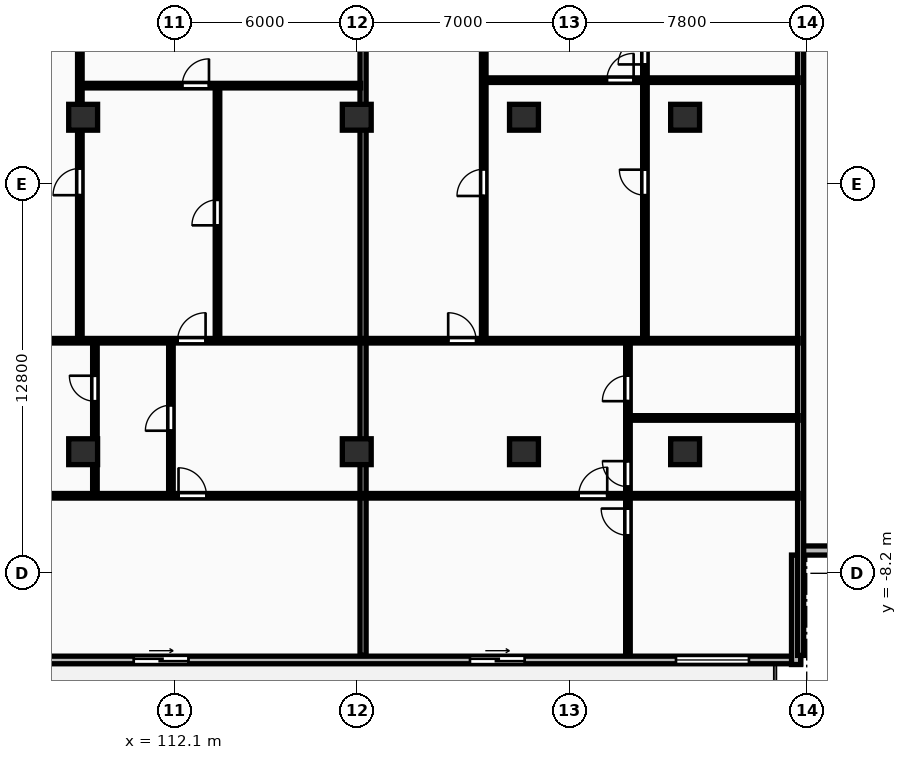
"""IFC4 building model, lengths in metres.
Left out: names, types, materials, properties, quantities, classifications, styles, units other than length and angle.
Written with IfcOpenShell. Run it as: python <this file> out.ifc"""

import sys

from ifc_helpers import new_model, si_unit, direction, frame, frame_2d, origin, origin_2d, place, context, subcontext, project, spatial, rectangle, extrude, element, fill, save


model = new_model("IFC4")
c1 = context("Model", 3, precision=1e-05, world=origin(), true_north=direction((0.0, 1.0)))
c2 = subcontext(c1, "Body", "Model", "MODEL_VIEW")
j1 = project(units=[si_unit("LENGTHUNIT", "METRE"), si_unit("PLANEANGLEUNIT", "RADIAN")], contexts=[c1])
p1 = place(None, origin())
s1 = spatial("IfcSite", under=j1, at=p1, CompositionType="ELEMENT")
p2 = place(p1, origin())
s2 = spatial("IfcBuilding", under=s1, at=p2, CompositionType="ELEMENT")
p3 = place(p2, frame((0.0, 0.0, 24.0)))
s3 = spatial("IfcBuildingStorey", under=s2, at=p3, CompositionType="ELEMENT", Elevation=24.0)
for number, where, z_axis, x_axis in (
    (1, (109.1, -4.2, 0.0), (0.0, 0.0, 1.0), (1.0, 0.0, 0.0)),
    (2, (109.1, 6.8, 0.0), (0.0, 0.0, 1.0), (1.0, 0.0, 0.0)),
    (3, (118.1, -4.2, 0.0), (0.0, 0.0, 1.0), (1.0, 0.0, 0.0)),
    (4, (118.1, 6.8, 0.0), (0.0, 0.0, 1.0), (1.0, 0.0, 0.0)),
    (5, (123.6, -4.2, 0.0), (0.0, 0.0, 1.0), (1.0, 0.0, 0.0)),
    (6, (123.6, 6.8, 0.0), (0.0, 0.0, 1.0), (1.0, 0.0, 0.0)),
    (7, (128.9, -4.2, 0.0), (0.0, 0.0, 1.0), (1.0, 0.0, 0.0)),
    (8, (128.9, 6.8, 0.0), (0.0, 0.0, 1.0), (1.0, 0.0, 0.0)),
):
    element("IfcColumn", number, at=place(p3, frame(where, z_axis=z_axis, x_axis=x_axis)), inside=s3, PredefinedType="COLUMN", context=c2, shape_type="SweptSolid", body=[
        extrude(rectangle(XDim=0.95, YDim=0.85, at=origin_2d()), origin(), (0.0, 0.0, 1.0), 3.25),
    ])
p4 = place(p3, frame((70.7, -11.05, 0.0), z_axis=(0.0, 0.0, 1.0), x_axis=(1.0, 0.0, 0.0)))
e9 = element("IfcWall", 9, at=p4, inside=s3, PredefinedType="STANDARD", context=c2, shape_type="SweptSolid", body=[
    extrude(rectangle(XDim=62.0, YDim=0.25, at=frame_2d((31.0, 0.0))), origin(), (0.0, 0.0, 1.0), 2.97),
])
p5 = place(p4, frame((4.636, 0.0, 0.0)))
e10 = element("IfcOpeningElement", 10, at=p5, cuts=e9, PredefinedType="OPENING", context=c2, shape_type="SweptSolid", body=[
    extrude(rectangle(XDim=1.8, YDim=2.2, at=frame_2d((0.9, 1.1))), frame((0.0, 0.135, 0.0), z_axis=(0.0, -1.0, 0.0), x_axis=(1.0, 0.0, 0.0)), (0.0, 0.0, 1.0), 0.27),
])
p6 = place(p4, frame((16.261, 0.0, 0.0)))
e11 = element("IfcOpeningElement", 11, at=p6, cuts=e9, PredefinedType="OPENING", context=c2, shape_type="SweptSolid", body=[
    extrude(rectangle(XDim=1.8, YDim=2.2, at=frame_2d((0.9, 1.1))), frame((0.0, 0.135, 0.0), z_axis=(0.0, -1.0, 0.0), x_axis=(1.0, 0.0, 0.0)), (0.0, 0.0, 1.0), 0.27),
])
p7 = place(p4, frame((27.886, 0.0, 0.0)))
e12 = element("IfcOpeningElement", 12, at=p7, cuts=e9, PredefinedType="OPENING", context=c2, shape_type="SweptSolid", body=[
    extrude(rectangle(XDim=1.8, YDim=2.2, at=frame_2d((0.9, 1.1))), frame((0.0, 0.135, 0.0), z_axis=(0.0, -1.0, 0.0), x_axis=(1.0, 0.0, 0.0)), (0.0, 0.0, 1.0), 0.27),
])
p8 = place(p4, frame((40.064, 0.0, 0.0)))
e13 = element("IfcOpeningElement", 13, at=p8, cuts=e9, PredefinedType="OPENING", context=c2, shape_type="SweptSolid", body=[
    extrude(rectangle(XDim=1.8, YDim=2.2, at=frame_2d((0.9, 1.1))), frame((0.0, 0.135, 0.0), z_axis=(0.0, -1.0, 0.0), x_axis=(1.0, 0.0, 0.0)), (0.0, 0.0, 1.0), 0.27),
])
p9 = place(p4, frame((51.124, 0.0, 0.0)))
e14 = element("IfcOpeningElement", 14, at=p9, cuts=e9, PredefinedType="OPENING", context=c2, shape_type="SweptSolid", body=[
    extrude(rectangle(XDim=1.8, YDim=2.2, at=frame_2d((0.9, 1.1))), frame((0.0, 0.135, 0.0), z_axis=(0.0, -1.0, 0.0), x_axis=(1.0, 0.0, 0.0)), (0.0, 0.0, 1.0), 0.27),
])
p10 = place(p4, frame((57.9, 0.0, 0.85)))
e15 = element("IfcOpeningElement", 15, at=p10, cuts=e9, PredefinedType="OPENING", context=c2, shape_type="SweptSolid", body=[
    extrude(rectangle(XDim=2.4, YDim=1.9, at=frame_2d((1.2, 0.95))), frame((0.0, 0.135, 0.0), z_axis=(0.0, -1.0, 0.0), x_axis=(1.0, 0.0, 0.0)), (0.0, 0.0, 1.0), 0.27),
])
p11 = place(p3, frame((132.55, -11.2, 0.0), z_axis=(0.0, 0.0, 1.0), x_axis=(0.0, 1.0, 0.0)))
e16 = element("IfcWall", 16, at=p11, inside=s3, PredefinedType="STANDARD", context=c2, shape_type="SweptSolid", body=[
    extrude(rectangle(XDim=3.6, YDim=0.3, at=frame_2d((1.8, 0.0))), origin(), (0.0, 0.0, 1.0), 2.97),
])
p12 = place(p3, frame((132.7, -7.45, 0.0), z_axis=(0.0, 0.0, 1.0), x_axis=(1.0, 0.0, 0.0)))
e17 = element("IfcWall", 17, at=p12, inside=s3, PredefinedType="STANDARD", context=c2, shape_type="SweptSolid", body=[
    extrude(rectangle(XDim=3.6, YDim=0.3, at=frame_2d((1.8, 0.0))), origin(), (0.0, 0.0, 1.0), 2.97),
])
p13 = place(p3, frame((132.7, -10.9, 0.0), z_axis=(0.0, 0.0, 1.0), x_axis=(0.0, 1.0, 0.0)))
e18 = element("IfcWall", 18, at=p13, inside=s3, PredefinedType="PARTITIONING", context=c2, shape_type="SweptSolid", body=[
    extrude(rectangle(XDim=27.07, YDim=0.2, at=frame_2d((13.535, 0.0))), origin(), (0.0, 0.0, 1.0), 2.97),
])
p14 = place(p3, frame((118.307, -10.9, 0.0), z_axis=(0.0, 0.0, 1.0), x_axis=(0.0, 1.0, 0.0)))
e19 = element("IfcWall", 19, at=p14, inside=s3, PredefinedType="PARTITIONING", context=c2, shape_type="SweptSolid", body=[
    extrude(rectangle(XDim=27.07, YDim=0.2, at=frame_2d((13.535, 0.0))), origin(), (0.0, 0.0, 1.0), 2.22),
])
p15 = place(p3, frame((113.519, -0.51, 0.0), z_axis=(0.0, 0.0, 1.0), x_axis=(0.0, 1.0, 0.0)))
e20 = element("IfcWall", 20, at=p15, inside=s3, PredefinedType="PARTITIONING", context=c2, shape_type="SweptSolid", body=[
    extrude(rectangle(XDim=8.35, YDim=0.15, at=frame_2d((4.175, 0.0))), origin(), (0.0, 0.0, 1.0), 2.97),
])
p16 = place(p15, frame((3.755, 0.0, 0.0)))
e21 = element("IfcOpeningElement", 21, at=p16, cuts=e20, PredefinedType="OPENING", context=c2, shape_type="SweptSolid", body=[
    extrude(rectangle(XDim=0.84, YDim=2.04, at=frame_2d((0.42, 1.02))), frame((0.0, 0.085, 0.0), z_axis=(0.0, -1.0, 0.0), x_axis=(1.0, 0.0, 0.0)), (0.0, 0.0, 1.0), 0.17),
])
p17 = place(p3, frame((109.052, 7.84, 0.0), z_axis=(0.0, 0.0, 1.0), x_axis=(1.0, 0.0, 0.0)))
e22 = element("IfcWall", 22, at=p17, inside=s3, PredefinedType="PARTITIONING", context=c2, shape_type="SweptSolid", body=[
    extrude(rectangle(XDim=9.176, YDim=0.15, at=frame_2d((4.588, 0.0))), origin(), (0.0, 0.0, 1.0), 2.97),
])
p18 = place(p17, frame((3.307, 0.0, 0.0)))
e23 = element("IfcOpeningElement", 23, at=p18, cuts=e22, PredefinedType="OPENING", context=c2, shape_type="SweptSolid", body=[
    extrude(rectangle(XDim=0.88, YDim=2.06, at=frame_2d((0.44, 1.03))), frame((0.0, 0.085, 0.0), z_axis=(0.0, -1.0, 0.0), x_axis=(1.0, 0.0, 0.0)), (0.0, 0.0, 1.0), 0.17),
])
p19 = place(p3, frame((108.991, -0.51, 0.0), z_axis=(0.0, 0.0, 1.0), x_axis=(0.0, 1.0, 0.0)))
e24 = element("IfcWall", 24, at=p19, inside=s3, PredefinedType="PARTITIONING", context=c2, shape_type="SweptSolid", body=[
    extrude(rectangle(XDim=16.7, YDim=0.15, at=frame_2d((8.35, 0.0))), origin(), (0.0, 0.0, 1.0), 2.22),
])
p20 = place(p19, frame((4.747, 0.0, 0.0)))
e25 = element("IfcOpeningElement", 25, at=p20, cuts=e24, PredefinedType="OPENING", context=c2, shape_type="SweptSolid", body=[
    extrude(rectangle(XDim=0.88, YDim=2.06, at=frame_2d((0.44, 1.03))), frame((0.0, 0.085, 0.0), z_axis=(0.0, -1.0, 0.0), x_axis=(1.0, 0.0, 0.0)), (0.0, 0.0, 1.0), 0.17),
])
p21 = place(p3, frame((109.487, -5.59, 0.0), z_axis=(0.0, 0.0, 1.0), x_axis=(0.0, 1.0, 0.0)))
e26 = element("IfcWall", 26, at=p21, inside=s3, PredefinedType="PARTITIONING", context=c2, shape_type="SweptSolid", body=[
    extrude(rectangle(XDim=5.0, YDim=0.15, at=frame_2d((2.5, 0.0))), origin(), (0.0, 0.0, 1.0), 2.22),
])
p22 = place(p21, frame((3.049, 0.0, 0.0)))
e27 = element("IfcOpeningElement", 27, at=p22, cuts=e26, PredefinedType="OPENING", context=c2, shape_type="SweptSolid", body=[
    extrude(rectangle(XDim=0.84, YDim=2.04, at=frame_2d((0.42, 1.02))), frame((0.0, 0.085, 0.0), z_axis=(0.0, -1.0, 0.0), x_axis=(1.0, 0.0, 0.0)), (0.0, 0.0, 1.0), 0.17),
])
p23 = place(p3, frame((111.987, -5.59, 0.0), z_axis=(0.0, 0.0, 1.0), x_axis=(0.0, 1.0, 0.0)))
e28 = element("IfcWall", 28, at=p23, inside=s3, PredefinedType="PARTITIONING", context=c2, shape_type="SweptSolid", body=[
    extrude(rectangle(XDim=5.0, YDim=0.15, at=frame_2d((2.5, 0.0))), origin(), (0.0, 0.0, 1.0), 2.97),
])
p24 = place(p23, frame((2.08, 0.0, 0.0)))
e29 = element("IfcOpeningElement", 29, at=p24, cuts=e28, PredefinedType="OPENING", context=c2, shape_type="SweptSolid", body=[
    extrude(rectangle(XDim=0.84, YDim=2.04, at=frame_2d((0.42, 1.02))), frame((0.0, 0.085, 0.0), z_axis=(0.0, -1.0, 0.0), x_axis=(1.0, 0.0, 0.0)), (0.0, 0.0, 1.0), 0.17),
])
p25 = place(p3, frame((105.101, -0.55, 0.0), z_axis=(0.0, 0.0, 1.0), x_axis=(1.0, 0.0, 0.0)))
e30 = element("IfcWall", 30, at=p25, inside=s3, PredefinedType="PARTITIONING", context=c2, shape_type="SweptSolid", body=[
    extrude(rectangle(XDim=13.126, YDim=0.15, at=frame_2d((6.563, 0.0))), origin(), (0.0, 0.0, 1.0), 2.97),
])
p26 = place(p25, frame((7.106, 0.0, 0.0)))
e31 = element("IfcOpeningElement", 31, at=p26, cuts=e30, PredefinedType="OPENING", context=c2, shape_type="SweptSolid", body=[
    extrude(rectangle(XDim=0.92, YDim=2.08, at=frame_2d((0.46, 1.04))), frame((0.0, 0.085, 0.0), z_axis=(0.0, -1.0, 0.0), x_axis=(1.0, 0.0, 0.0)), (0.0, 0.0, 1.0), 0.17),
])
p27 = place(p3, frame((105.101, -5.65, 0.0), z_axis=(0.0, 0.0, 1.0), x_axis=(1.0, 0.0, 0.0)))
e32 = element("IfcWall", 32, at=p27, inside=s3, PredefinedType="PARTITIONING", context=c2, shape_type="SweptSolid", body=[
    extrude(rectangle(XDim=13.126, YDim=0.15, at=frame_2d((6.563, 0.0))), origin(), (0.0, 0.0, 1.0), 2.97),
])
p28 = place(p27, frame((7.136, 0.0, 0.0)))
e33 = element("IfcOpeningElement", 33, at=p28, cuts=e32, PredefinedType="OPENING", context=c2, shape_type="SweptSolid", body=[
    extrude(rectangle(XDim=0.92, YDim=2.08, at=frame_2d((0.46, 1.04))), frame((0.0, 0.085, 0.0), z_axis=(0.0, -1.0, 0.0), x_axis=(1.0, 0.0, 0.0)), (0.0, 0.0, 1.0), 0.17),
])
p29 = place(p3, frame((127.579, -0.51, 0.0), z_axis=(0.0, 0.0, 1.0), x_axis=(0.0, 1.0, 0.0)))
e34 = element("IfcWall", 34, at=p29, inside=s3, PredefinedType="PARTITIONING", context=c2, shape_type="SweptSolid", body=[
    extrude(rectangle(XDim=16.7, YDim=0.15, at=frame_2d((8.35, 0.0))), origin(), (0.0, 0.0, 1.0), 2.97),
])
p30 = place(p29, frame((4.746, 0.0, 0.0)))
e35 = element("IfcOpeningElement", 35, at=p30, cuts=e34, PredefinedType="OPENING", context=c2, shape_type="SweptSolid", body=[
    extrude(rectangle(XDim=0.84, YDim=2.04, at=frame_2d((0.42, 1.02))), frame((0.0, 0.085, 0.0), z_axis=(0.0, -1.0, 0.0), x_axis=(1.0, 0.0, 0.0)), (0.0, 0.0, 1.0), 0.17),
])
p31 = place(p29, frame((9.048, 0.0, 0.0)))
e36 = element("IfcOpeningElement", 36, at=p31, cuts=e34, PredefinedType="OPENING", context=c2, shape_type="SweptSolid", body=[
    extrude(rectangle(XDim=0.88, YDim=2.06, at=frame_2d((0.44, 1.03))), frame((0.0, 0.085, 0.0), z_axis=(0.0, -1.0, 0.0), x_axis=(1.0, 0.0, 0.0)), (0.0, 0.0, 1.0), 0.17),
])
p32 = place(p3, frame((122.337, 8.02, 0.0), z_axis=(0.0, 0.0, 1.0), x_axis=(1.0, 0.0, 0.0)))
e37 = element("IfcWall", 37, at=p32, inside=s3, PredefinedType="PARTITIONING", context=c2, shape_type="SweptSolid", body=[
    extrude(rectangle(XDim=10.283, YDim=0.15, at=frame_2d((5.142, 0.0))), origin(), (0.0, 0.0, 1.0), 2.97),
])
p33 = place(p32, frame((3.99, 0.0, 0.0)))
e38 = element("IfcOpeningElement", 38, at=p33, cuts=e37, PredefinedType="OPENING", context=c2, shape_type="SweptSolid", body=[
    extrude(rectangle(XDim=0.88, YDim=2.06, at=frame_2d((0.44, 1.03))), frame((0.0, 0.085, 0.0), z_axis=(0.0, -1.0, 0.0), x_axis=(1.0, 0.0, 0.0)), (0.0, 0.0, 1.0), 0.17),
])
p34 = place(p3, frame((122.277, -0.51, 0.0), z_axis=(0.0, 0.0, 1.0), x_axis=(0.0, 1.0, 0.0)))
e39 = element("IfcWall", 39, at=p34, inside=s3, PredefinedType="PARTITIONING", context=c2, shape_type="SweptSolid", body=[
    extrude(rectangle(XDim=16.7, YDim=0.15, at=frame_2d((8.35, 0.0))), origin(), (0.0, 0.0, 1.0), 2.97),
])
p35 = place(p34, frame((4.721, 0.0, 0.0)))
e40 = element("IfcOpeningElement", 40, at=p35, cuts=e39, PredefinedType="OPENING", context=c2, shape_type="SweptSolid", body=[
    extrude(rectangle(XDim=0.88, YDim=2.06, at=frame_2d((0.44, 1.03))), frame((0.0, 0.085, 0.0), z_axis=(0.0, -1.0, 0.0), x_axis=(1.0, 0.0, 0.0)), (0.0, 0.0, 1.0), 0.17),
])
p36 = place(p3, frame((127.08, -3.09, 0.0), z_axis=(0.0, 0.0, 1.0), x_axis=(1.0, 0.0, 0.0)))
e41 = element("IfcWall", 41, at=p36, inside=s3, PredefinedType="PARTITIONING", context=c2, shape_type="SweptSolid", body=[
    extrude(rectangle(XDim=5.54, YDim=0.15, at=frame_2d((2.77, 0.0))), origin(), (0.0, 0.0, 1.0), 2.97),
])
p37 = place(p3, frame((127.02, -10.9, 0.0), z_axis=(0.0, 0.0, 1.0), x_axis=(0.0, 1.0, 0.0)))
e42 = element("IfcWall", 42, at=p37, inside=s3, PredefinedType="PARTITIONING", context=c2, shape_type="SweptSolid", body=[
    extrude(rectangle(XDim=10.31, YDim=0.15, at=frame_2d((5.155, 0.0))), origin(), (0.0, 0.0, 1.0), 2.97),
])
p38 = place(p37, frame((5.55, 0.0, 0.0)))
e43 = element("IfcOpeningElement", 43, at=p38, cuts=e42, PredefinedType="OPENING", context=c2, shape_type="SweptSolid", body=[
    extrude(rectangle(XDim=0.84, YDim=2.04, at=frame_2d((0.42, 1.02))), frame((0.0, 0.085, 0.0), z_axis=(0.0, -1.0, 0.0), x_axis=(1.0, 0.0, 0.0)), (0.0, 0.0, 1.0), 0.17),
])
p39 = place(p37, frame((8.362, 0.0, 0.0)))
e44 = element("IfcOpeningElement", 44, at=p39, cuts=e42, PredefinedType="OPENING", context=c2, shape_type="SweptSolid", body=[
    extrude(rectangle(XDim=0.84, YDim=2.04, at=frame_2d((0.42, 1.02))), frame((0.0, 0.085, 0.0), z_axis=(0.0, -1.0, 0.0), x_axis=(1.0, 0.0, 0.0)), (0.0, 0.0, 1.0), 0.17),
])
p40 = place(p37, frame((3.95, 0.0, 0.0)))
e45 = element("IfcOpeningElement", 45, at=p40, cuts=e42, PredefinedType="OPENING", context=c2, shape_type="SweptSolid", body=[
    extrude(rectangle(XDim=0.88, YDim=2.06, at=frame_2d((0.44, 1.03))), frame((0.0, 0.085, 0.0), z_axis=(0.0, -1.0, 0.0), x_axis=(1.0, 0.0, 0.0)), (0.0, 0.0, 1.0), 0.17),
])
p41 = place(p3, frame((118.387, -0.55, 0.0), z_axis=(0.0, 0.0, 1.0), x_axis=(1.0, 0.0, 0.0)))
e46 = element("IfcWall", 46, at=p41, inside=s3, PredefinedType="PARTITIONING", context=c2, shape_type="SweptSolid", body=[
    extrude(rectangle(XDim=14.233, YDim=0.15, at=frame_2d((7.116, 0.0))), origin(), (0.0, 0.0, 1.0), 2.97),
])
p42 = place(p41, frame((2.72, 0.0, 0.0)))
e47 = element("IfcOpeningElement", 47, at=p42, cuts=e46, PredefinedType="OPENING", context=c2, shape_type="SweptSolid", body=[
    extrude(rectangle(XDim=0.92, YDim=2.08, at=frame_2d((0.46, 1.04))), frame((0.0, 0.085, 0.0), z_axis=(0.0, -1.0, 0.0), x_axis=(1.0, 0.0, 0.0)), (0.0, 0.0, 1.0), 0.17),
])
p43 = place(p3, frame((118.387, -5.65, 0.0), z_axis=(0.0, 0.0, 1.0), x_axis=(1.0, 0.0, 0.0)))
e48 = element("IfcWall", 48, at=p43, inside=s3, PredefinedType="PARTITIONING", context=c2, shape_type="SweptSolid", body=[
    extrude(rectangle(XDim=14.233, YDim=0.15, at=frame_2d((7.116, 0.0))), origin(), (0.0, 0.0, 1.0), 2.97),
])
p44 = place(p43, frame((7.011, 0.0, 0.0)))
e49 = element("IfcOpeningElement", 49, at=p44, cuts=e48, PredefinedType="OPENING", context=c2, shape_type="SweptSolid", body=[
    extrude(rectangle(XDim=0.94, YDim=2.1, at=frame_2d((0.47, 1.05))), frame((0.0, 0.085, 0.0), z_axis=(0.0, -1.0, 0.0), x_axis=(1.0, 0.0, 0.0)), (0.0, 0.0, 1.0), 0.17),
])
p45 = place(p8, origin())
e50 = element("IfcDoor", 50, at=p45, inside=s3, OperationType="SLIDING_TO_RIGHT", PredefinedType="DOOR", context=c2, shape_type="SweptSolid", body=[
    extrude(rectangle(XDim=1.8, YDim=2.2, at=frame_2d((0.9, 1.1))), frame((0.0, 0.025, 0.0), z_axis=(0.0, -1.0, 0.0), x_axis=(1.0, 0.0, 0.0)), (0.0, 0.0, 1.0), 0.05),
])
fill(e13, e50)
p46 = place(p9, origin())
e51 = element("IfcDoor", 51, at=p46, inside=s3, OperationType="SLIDING_TO_RIGHT", PredefinedType="DOOR", context=c2, shape_type="SweptSolid", body=[
    extrude(rectangle(XDim=1.8, YDim=2.2, at=frame_2d((0.9, 1.1))), frame((0.0, 0.025, 0.0), z_axis=(0.0, -1.0, 0.0), x_axis=(1.0, 0.0, 0.0)), (0.0, 0.0, 1.0), 0.05),
])
fill(e14, e51)
p47 = place(p10, origin())
e52 = element("IfcWindow", 52, at=p47, inside=s3, PartitioningType="DOUBLE_PANEL_VERTICAL", PredefinedType="WINDOW", context=c2, shape_type="SweptSolid", body=[
    extrude(rectangle(XDim=2.4, YDim=1.9, at=frame_2d((1.2, 0.95))), frame((0.0, 0.03, 0.0), z_axis=(0.0, -1.0, 0.0), x_axis=(1.0, 0.0, 0.0)), (0.0, 0.0, 1.0), 0.06),
])
fill(e15, e52)
p48 = place(p16, origin())
e53 = element("IfcDoor", 53, at=p48, inside=s3, OperationType="SINGLE_SWING_LEFT", PredefinedType="DOOR", context=c2, shape_type="SweptSolid", body=[
    extrude(rectangle(XDim=0.84, YDim=2.04, at=frame_2d((0.42, 1.02))), frame((0.0, 0.025, 0.0), z_axis=(0.0, -1.0, 0.0), x_axis=(1.0, 0.0, 0.0)), (0.0, 0.0, 1.0), 0.05),
])
fill(e21, e53)
p49 = place(p18, origin())
e54 = element("IfcDoor", 54, at=p49, inside=s3, OperationType="SINGLE_SWING_RIGHT", PredefinedType="DOOR", context=c2, shape_type="SweptSolid", body=[
    extrude(rectangle(XDim=0.88, YDim=2.06, at=frame_2d((0.44, 1.03))), frame((0.0, 0.025, 0.0), z_axis=(0.0, -1.0, 0.0), x_axis=(1.0, 0.0, 0.0)), (0.0, 0.0, 1.0), 0.05),
])
fill(e23, e54)
p50 = place(p20, origin())
e55 = element("IfcDoor", 55, at=p50, inside=s3, OperationType="SINGLE_SWING_LEFT", PredefinedType="DOOR", context=c2, shape_type="SweptSolid", body=[
    extrude(rectangle(XDim=0.88, YDim=2.06, at=frame_2d((0.44, 1.03))), frame((0.0, 0.025, 0.0), z_axis=(0.0, -1.0, 0.0), x_axis=(1.0, 0.0, 0.0)), (0.0, 0.0, 1.0), 0.05),
])
fill(e25, e55)
p51 = place(p22, origin())
e56 = element("IfcDoor", 56, at=p51, inside=s3, OperationType="SINGLE_SWING_RIGHT", PredefinedType="DOOR", context=c2, shape_type="SweptSolid", body=[
    extrude(rectangle(XDim=0.84, YDim=2.04, at=frame_2d((0.42, 1.02))), frame((0.0, 0.025, 0.0), z_axis=(0.0, -1.0, 0.0), x_axis=(1.0, 0.0, 0.0)), (0.0, 0.0, 1.0), 0.05),
])
fill(e27, e56)
p52 = place(p24, origin())
e57 = element("IfcDoor", 57, at=p52, inside=s3, OperationType="SINGLE_SWING_LEFT", PredefinedType="DOOR", context=c2, shape_type="SweptSolid", body=[
    extrude(rectangle(XDim=0.84, YDim=2.04, at=frame_2d((0.42, 1.02))), frame((0.0, 0.025, 0.0), z_axis=(0.0, -1.0, 0.0), x_axis=(1.0, 0.0, 0.0)), (0.0, 0.0, 1.0), 0.05),
])
fill(e29, e57)
p53 = place(p26, origin())
e58 = element("IfcDoor", 58, at=p53, inside=s3, OperationType="SINGLE_SWING_RIGHT", PredefinedType="DOOR", context=c2, shape_type="SweptSolid", body=[
    extrude(rectangle(XDim=0.92, YDim=2.08, at=frame_2d((0.46, 1.04))), frame((0.0, 0.025, 0.0), z_axis=(0.0, -1.0, 0.0), x_axis=(1.0, 0.0, 0.0)), (0.0, 0.0, 1.0), 0.05),
])
fill(e31, e58)
p54 = place(p28, origin())
e59 = element("IfcDoor", 59, at=p54, inside=s3, OperationType="SINGLE_SWING_LEFT", PredefinedType="DOOR", context=c2, shape_type="SweptSolid", body=[
    extrude(rectangle(XDim=0.92, YDim=2.08, at=frame_2d((0.46, 1.04))), frame((0.0, 0.025, 0.0), z_axis=(0.0, -1.0, 0.0), x_axis=(1.0, 0.0, 0.0)), (0.0, 0.0, 1.0), 0.05),
])
fill(e33, e59)
p55 = place(p30, origin())
e60 = element("IfcDoor", 60, at=p55, inside=s3, OperationType="SINGLE_SWING_RIGHT", PredefinedType="DOOR", context=c2, shape_type="SweptSolid", body=[
    extrude(rectangle(XDim=0.84, YDim=2.04, at=frame_2d((0.42, 1.02))), frame((0.0, 0.025, 0.0), z_axis=(0.0, -1.0, 0.0), x_axis=(1.0, 0.0, 0.0)), (0.0, 0.0, 1.0), 0.05),
])
fill(e35, e60)
p56 = place(p31, origin())
e61 = element("IfcDoor", 61, at=p56, inside=s3, OperationType="SINGLE_SWING_LEFT", PredefinedType="DOOR", context=c2, shape_type="SweptSolid", body=[
    extrude(rectangle(XDim=0.88, YDim=2.06, at=frame_2d((0.44, 1.03))), frame((0.0, 0.025, 0.0), z_axis=(0.0, -1.0, 0.0), x_axis=(1.0, 0.0, 0.0)), (0.0, 0.0, 1.0), 0.05),
])
fill(e36, e61)
p57 = place(p33, origin())
e62 = element("IfcDoor", 62, at=p57, inside=s3, OperationType="SINGLE_SWING_RIGHT", PredefinedType="DOOR", context=c2, shape_type="SweptSolid", body=[
    extrude(rectangle(XDim=0.88, YDim=2.06, at=frame_2d((0.44, 1.03))), frame((0.0, 0.025, 0.0), z_axis=(0.0, -1.0, 0.0), x_axis=(1.0, 0.0, 0.0)), (0.0, 0.0, 1.0), 0.05),
])
fill(e38, e62)
p58 = place(p35, origin())
e63 = element("IfcDoor", 63, at=p58, inside=s3, OperationType="SINGLE_SWING_LEFT", PredefinedType="DOOR", context=c2, shape_type="SweptSolid", body=[
    extrude(rectangle(XDim=0.88, YDim=2.06, at=frame_2d((0.44, 1.03))), frame((0.0, 0.025, 0.0), z_axis=(0.0, -1.0, 0.0), x_axis=(1.0, 0.0, 0.0)), (0.0, 0.0, 1.0), 0.05),
])
fill(e40, e63)
p59 = place(p38, origin())
e64 = element("IfcDoor", 64, at=p59, inside=s3, OperationType="SINGLE_SWING_RIGHT", PredefinedType="DOOR", context=c2, shape_type="SweptSolid", body=[
    extrude(rectangle(XDim=0.84, YDim=2.04, at=frame_2d((0.42, 1.02))), frame((0.0, 0.025, 0.0), z_axis=(0.0, -1.0, 0.0), x_axis=(1.0, 0.0, 0.0)), (0.0, 0.0, 1.0), 0.05),
])
fill(e43, e64)
p60 = place(p39, origin())
e65 = element("IfcDoor", 65, at=p60, inside=s3, OperationType="SINGLE_SWING_LEFT", PredefinedType="DOOR", context=c2, shape_type="SweptSolid", body=[
    extrude(rectangle(XDim=0.84, YDim=2.04, at=frame_2d((0.42, 1.02))), frame((0.0, 0.025, 0.0), z_axis=(0.0, -1.0, 0.0), x_axis=(1.0, 0.0, 0.0)), (0.0, 0.0, 1.0), 0.05),
])
fill(e44, e65)
p61 = place(p40, origin())
e66 = element("IfcDoor", 66, at=p61, inside=s3, OperationType="SINGLE_SWING_RIGHT", PredefinedType="DOOR", context=c2, shape_type="SweptSolid", body=[
    extrude(rectangle(XDim=0.88, YDim=2.06, at=frame_2d((0.44, 1.03))), frame((0.0, 0.025, 0.0), z_axis=(0.0, -1.0, 0.0), x_axis=(1.0, 0.0, 0.0)), (0.0, 0.0, 1.0), 0.05),
])
fill(e45, e66)
p62 = place(p42, origin())
e67 = element("IfcDoor", 67, at=p62, inside=s3, OperationType="SINGLE_SWING_LEFT", PredefinedType="DOOR", context=c2, shape_type="SweptSolid", body=[
    extrude(rectangle(XDim=0.92, YDim=2.08, at=frame_2d((0.46, 1.04))), frame((0.0, 0.025, 0.0), z_axis=(0.0, -1.0, 0.0), x_axis=(1.0, 0.0, 0.0)), (0.0, 0.0, 1.0), 0.05),
])
fill(e47, e67)
p63 = place(p44, origin())
e68 = element("IfcDoor", 68, at=p63, inside=s3, OperationType="SINGLE_SWING_RIGHT", PredefinedType="DOOR", context=c2, shape_type="SweptSolid", body=[
    extrude(rectangle(XDim=0.94, YDim=2.1, at=frame_2d((0.47, 1.05))), frame((0.0, 0.025, 0.0), z_axis=(0.0, -1.0, 0.0), x_axis=(1.0, 0.0, 0.0)), (0.0, 0.0, 1.0), 0.05),
])
fill(e49, e68)
save(model, sys.argv[1])
